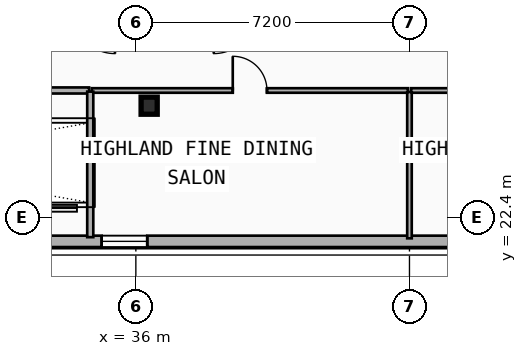
"""IFC4 building model, lengths in metres.
Left out: names, types, materials, properties, quantities, classifications, styles, units other than length and angle.
Written with IfcOpenShell. Run it as: python <this file> out.ifc"""

import sys

from ifc_helpers import new_model, si_unit, direction, frame, frame_2d, origin, origin_2d, place, context, subcontext, project, spatial, rectangle, i_section, extrude, element, fill, save


model = new_model("IFC4")
c1 = context("Model", 3, precision=1e-05, world=origin(), true_north=direction((0.0, 1.0)))
c2 = subcontext(c1, "Body", "Model", "MODEL_VIEW")
j1 = project(units=[si_unit("LENGTHUNIT", "METRE"), si_unit("PLANEANGLEUNIT", "RADIAN")], contexts=[c1])
p1 = place(None, origin())
s1 = spatial("IfcSite", under=j1, at=p1, CompositionType="ELEMENT")
p2 = place(p1, origin())
s2 = spatial("IfcBuilding", under=s1, at=p2, CompositionType="ELEMENT")
p3 = place(p2, frame((0.0, 0.0, 71.0)))
s3 = spatial("IfcBuildingStorey", under=s2, at=p3, CompositionType="ELEMENT", Elevation=71.0)
p4 = place(p3, frame((36.35, 25.35, 0.0), z_axis=(0.0, 0.0, 1.0), x_axis=(1.0, 0.0, 0.0)))
e1 = element("IfcColumn", 1, at=p4, inside=s3, PredefinedType="COLUMN", context=c2, shape_type="SweptSolid", body=[
    extrude(i_section(OverallWidth=0.424, OverallDepth=0.45, WebThickness=0.041, FlangeThickness=0.065, FilletRadius=0.015, at=origin_2d()), origin(), (0.0, 0.0, 1.0), 3.5),
])
p5 = place(p3, frame((53.4, 21.78, 0.0), z_axis=(0.0, 0.0, 1.0), x_axis=(-1.0, 0.0, 0.0)))
e2 = element("IfcWall", 2, at=p5, inside=s3, PredefinedType="SOLIDWALL", context=c2, shape_type="SweptSolid", body=[
    extrude(rectangle(XDim=49.2, YDim=0.3, at=frame_2d((24.6, 0.0))), origin(), (0.0, 0.0, 1.0), 2.66),
])
p6 = place(p5, frame((47.08, 0.0, 0.68)))
e3 = element("IfcOpeningElement", 3, at=p6, cuts=e2, PredefinedType="OPENING", context=c2, shape_type="SweptSolid", body=[
    extrude(rectangle(XDim=1.8, YDim=1.8, at=frame_2d((0.9, 0.9))), frame((0.0, 0.16, 0.0), z_axis=(0.0, -1.0, 0.0), x_axis=(1.0, 0.0, 0.0)), (0.0, 0.0, 1.0), 0.32),
])
p7 = place(p5, frame((42.3, 0.0, 0.68)))
e4 = element("IfcOpeningElement", 4, at=p7, cuts=e2, PredefinedType="OPENING", context=c2, shape_type="SweptSolid", body=[
    extrude(rectangle(XDim=1.8, YDim=1.8, at=frame_2d((0.9, 0.9))), frame((0.0, 0.16, 0.0), z_axis=(0.0, -1.0, 0.0), x_axis=(1.0, 0.0, 0.0)), (0.0, 0.0, 1.0), 0.32),
])
p8 = place(p5, frame((30.9, 0.0, 0.48)))
e5 = element("IfcOpeningElement", 5, at=p8, cuts=e2, PredefinedType="OPENING", context=c2, shape_type="SweptSolid", body=[
    extrude(rectangle(XDim=1.2, YDim=1.5, at=frame_2d((0.6, 0.75))), frame((0.0, 0.16, 0.0), z_axis=(0.0, -1.0, 0.0), x_axis=(1.0, 0.0, 0.0)), (0.0, 0.0, 1.0), 0.32),
])
p9 = place(p5, frame((17.1, 0.0, 0.48)))
e6 = element("IfcOpeningElement", 6, at=p9, cuts=e2, PredefinedType="OPENING", context=c2, shape_type="SweptSolid", body=[
    extrude(rectangle(XDim=1.2, YDim=1.5, at=frame_2d((0.6, 0.75))), frame((0.0, 0.16, 0.0), z_axis=(0.0, -1.0, 0.0), x_axis=(1.0, 0.0, 0.0)), (0.0, 0.0, 1.0), 0.32),
])
p10 = place(p5, frame((3.684, 0.0, 0.68)))
e7 = element("IfcOpeningElement", 7, at=p10, cuts=e2, PredefinedType="OPENING", context=c2, shape_type="SweptSolid", body=[
    extrude(rectangle(XDim=1.8, YDim=1.8, at=frame_2d((0.9, 0.9))), frame((0.0, 0.16, 0.0), z_axis=(0.0, -1.0, 0.0), x_axis=(1.0, 0.0, 0.0)), (0.0, 0.0, 1.0), 0.32),
])
p11 = place(p5, frame((0.61, 0.0, 0.68)))
e8 = element("IfcOpeningElement", 8, at=p11, cuts=e2, PredefinedType="OPENING", context=c2, shape_type="SweptSolid", body=[
    extrude(rectangle(XDim=1.8, YDim=1.8, at=frame_2d((0.9, 0.9))), frame((0.0, 0.16, 0.0), z_axis=(0.0, -1.0, 0.0), x_axis=(1.0, 0.0, 0.0)), (0.0, 0.0, 1.0), 0.32),
])
p12 = place(p3, frame((34.84, 25.75, 0.0), z_axis=(0.0, 0.0, 1.0), x_axis=(1.0, 0.0, 0.0)))
e9 = element("IfcWall", 9, at=p12, inside=s3, PredefinedType="PARTITIONING", context=c2, shape_type="SweptSolid", body=[
    extrude(rectangle(XDim=8.32, YDim=0.12, at=frame_2d((4.16, 0.0))), origin(), (0.0, 0.0, 1.0), 2.25),
])
p13 = place(p12, frame((3.71, 0.0, 0.0)))
e10 = element("IfcOpeningElement", 10, at=p13, cuts=e9, PredefinedType="OPENING", context=c2, shape_type="SweptSolid", body=[
    extrude(rectangle(XDim=0.9, YDim=2.1, at=frame_2d((0.45, 1.05))), frame((0.0, 0.07, 0.0), z_axis=(0.0, -1.0, 0.0), x_axis=(1.0, 0.0, 0.0)), (0.0, 0.0, 1.0), 0.14),
])
p14 = place(p3, frame((43.24, 25.75, 0.0), z_axis=(0.0, 0.0, 1.0), x_axis=(1.0, 0.0, 0.0)))
e11 = element("IfcWall", 11, at=p14, inside=s3, PredefinedType="PARTITIONING", context=c2, shape_type="SweptSolid", body=[
    extrude(rectangle(XDim=7.12, YDim=0.12, at=frame_2d((3.56, 0.0))), origin(), (0.0, 0.0, 1.0), 2.25),
])
p15 = place(p14, frame((3.11, 0.0, 0.0)))
e12 = element("IfcOpeningElement", 12, at=p15, cuts=e11, PredefinedType="OPENING", context=c2, shape_type="SweptSolid", body=[
    extrude(rectangle(XDim=0.9, YDim=2.1, at=frame_2d((0.45, 1.05))), frame((0.0, 0.07, 0.0), z_axis=(0.0, -1.0, 0.0), x_axis=(1.0, 0.0, 0.0)), (0.0, 0.0, 1.0), 0.14),
])
p16 = place(p3, frame((43.2, 21.86, 0.0), z_axis=(0.0, 0.0, 1.0), x_axis=(0.0, 1.0, 0.0)))
e13 = element("IfcWall", 13, at=p16, inside=s3, PredefinedType="PARTITIONING", context=c2, shape_type="SweptSolid", body=[
    extrude(rectangle(XDim=3.85, YDim=0.12, at=frame_2d((1.925, 0.0))), origin(), (0.0, 0.0, 1.0), 2.72),
])
p17 = place(p3, frame((22.83, 25.75, 0.0), z_axis=(0.0, 0.0, 1.0), x_axis=(1.0, 0.0, 0.0)))
e14 = element("IfcWall", 14, at=p17, inside=s3, PredefinedType="PARTITIONING", context=c2, shape_type="SweptSolid", body=[
    extrude(rectangle(XDim=11.94, YDim=0.16, at=frame_2d((5.97, 0.0))), origin(), (0.0, 0.0, 1.0), 3.18),
])
p18 = place(p3, frame((34.8, 21.89, 0.0), z_axis=(0.0, 0.0, 1.0), x_axis=(0.0, 1.0, 0.0)))
e15 = element("IfcWall", 15, at=p18, inside=s3, PredefinedType="PARTITIONING", context=c2, shape_type="SweptSolid", body=[
    extrude(rectangle(XDim=3.83, YDim=0.16, at=frame_2d((1.915, 0.0))), origin(), (0.0, 0.0, 1.0), 2.62),
])
p19 = place(p9, origin())
e16 = element("IfcWindow", 16, at=p19, inside=s3, PartitioningType="SINGLE_PANEL", PredefinedType="WINDOW", context=c2, shape_type="SweptSolid", body=[
    extrude(rectangle(XDim=1.2, YDim=1.5, at=frame_2d((0.6, 0.75))), frame((0.0, 0.03, 0.0), z_axis=(0.0, -1.0, 0.0), x_axis=(1.0, 0.0, 0.0)), (0.0, 0.0, 1.0), 0.06),
])
fill(e6, e16)
p20 = place(p13, origin())
e17 = element("IfcDoor", 17, at=p20, inside=s3, OperationType="SINGLE_SWING_LEFT", PredefinedType="DOOR", context=c2, shape_type="SweptSolid", body=[
    extrude(rectangle(XDim=0.9, YDim=2.1, at=frame_2d((0.45, 1.05))), frame((0.0, 0.025, 0.0), z_axis=(0.0, -1.0, 0.0), x_axis=(1.0, 0.0, 0.0)), (0.0, 0.0, 1.0), 0.05),
])
fill(e10, e17)
save(model, sys.argv[1])
